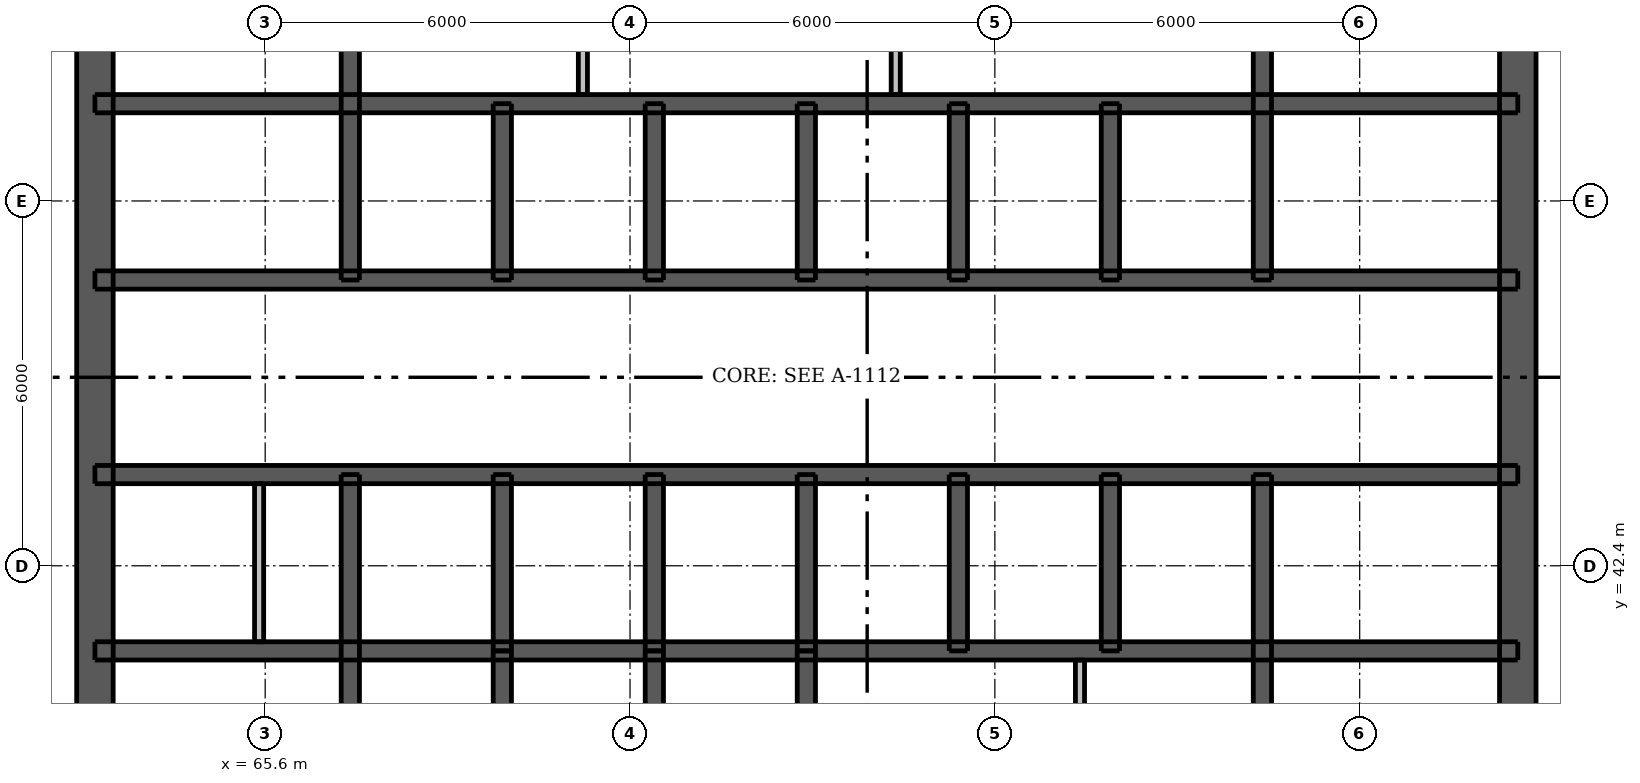
"""IFC4 building model, lengths in metres.
Left out: names, types, materials, properties, quantities, classifications, styles, units other than length and angle.
Written with IfcOpenShell. Run it as: python <this file> out.ifc"""

import sys

from ifc_helpers import new_model, si_unit, direction, frame, frame_2d, origin, place, context, subcontext, project, spatial, rectangle, extrude, element, fill, save


model = new_model("IFC4")
c1 = context("Model", 3, precision=1e-05, world=origin(), true_north=direction((0.0, 1.0)))
c2 = subcontext(c1, "Body", "Model", "MODEL_VIEW")
j1 = project(units=[si_unit("LENGTHUNIT", "METRE"), si_unit("PLANEANGLEUNIT", "RADIAN")], contexts=[c1])
p1 = place(None, origin())
s1 = spatial("IfcSite", under=j1, at=p1, CompositionType="ELEMENT")
p2 = place(p1, origin())
s2 = spatial("IfcBuilding", under=s1, at=p2, CompositionType="ELEMENT")
p3 = place(p2, frame((0.0, 0.0, 216.7)))
s3 = spatial("IfcBuildingStorey", under=s2, at=p3, CompositionType="ELEMENT", Elevation=216.7)
p4 = place(p3, frame((62.8, 33.5, 0.0), z_axis=(0.0, 0.0, 1.0), x_axis=(0.0, 1.0, 0.0)))
e1 = element("IfcWall", 1, at=p4, inside=s3, PredefinedType="SHEAR", context=c2, shape_type="SweptSolid", body=[
    extrude(rectangle(XDim=24.0, YDim=0.6, at=frame_2d((12.0, 0.0))), origin(), (0.0, 0.0, 1.0), 3.05),
])
p5 = place(p4, frame((11.2, 0.0, 0.0)))
e2 = element("IfcOpeningElement", 2, at=p5, cuts=e1, PredefinedType="OPENING", context=c2, shape_type="SweptSolid", body=[
    extrude(rectangle(XDim=1.6, YDim=2.1, at=frame_2d((0.8, 1.05))), frame((0.0, 0.31, 0.0), z_axis=(0.0, -1.0, 0.0), x_axis=(1.0, 0.0, 0.0)), (0.0, 0.0, 1.0), 0.62),
])
p6 = place(p3, frame((86.2, 33.5, 0.0), z_axis=(0.0, 0.0, 1.0), x_axis=(0.0, 1.0, 0.0)))
e3 = element("IfcWall", 3, at=p6, inside=s3, PredefinedType="SHEAR", context=c2, shape_type="SweptSolid", body=[
    extrude(rectangle(XDim=24.0, YDim=0.6, at=frame_2d((12.0, 0.0))), origin(), (0.0, 0.0, 1.0), 3.05),
])
p7 = place(p6, frame((11.2, 0.0, 0.0)))
e4 = element("IfcOpeningElement", 4, at=p7, cuts=e3, PredefinedType="OPENING", context=c2, shape_type="SweptSolid", body=[
    extrude(rectangle(XDim=1.6, YDim=2.1, at=frame_2d((0.8, 1.05))), frame((0.0, 0.31, 0.0), z_axis=(0.0, -1.0, 0.0), x_axis=(1.0, 0.0, 0.0)), (0.0, 0.0, 1.0), 0.62),
])
p8 = place(p3, frame((62.8, 41.0, 0.0), z_axis=(0.0, 0.0, 1.0), x_axis=(1.0, 0.0, 0.0)))
e5 = element("IfcWall", 5, at=p8, inside=s3, PredefinedType="SHEAR", context=c2, shape_type="SweptSolid", body=[
    extrude(rectangle(XDim=23.4, YDim=0.3, at=frame_2d((11.7, 0.0))), origin(), (0.0, 0.0, 1.0), 3.05),
])
p9 = place(p3, frame((62.8, 43.9, 0.0), z_axis=(0.0, 0.0, 1.0), x_axis=(1.0, 0.0, 0.0)))
e6 = element("IfcWall", 6, at=p9, inside=s3, PredefinedType="SHEAR", context=c2, shape_type="SweptSolid", body=[
    extrude(rectangle(XDim=23.4, YDim=0.3, at=frame_2d((11.7, 0.0))), origin(), (0.0, 0.0, 1.0), 3.05),
])
p10 = place(p9, frame((1.05, 0.0, 0.0)))
e7 = element("IfcOpeningElement", 7, at=p10, cuts=e6, PredefinedType="OPENING", context=c2, shape_type="SweptSolid", body=[
    extrude(rectangle(XDim=0.9, YDim=2.1, at=frame_2d((0.45, 1.05))), frame((0.0, 0.16, 0.0), z_axis=(0.0, -1.0, 0.0), x_axis=(1.0, 0.0, 0.0)), (0.0, 0.0, 1.0), 0.32),
])
p11 = place(p9, frame((2.975, 0.0, 0.0)))
e8 = element("IfcOpeningElement", 8, at=p11, cuts=e6, PredefinedType="OPENING", context=c2, shape_type="SweptSolid", body=[
    extrude(rectangle(XDim=0.8, YDim=2.1, at=frame_2d((0.4, 1.05))), frame((0.0, 0.16, 0.0), z_axis=(0.0, -1.0, 0.0), x_axis=(1.0, 0.0, 0.0)), (0.0, 0.0, 1.0), 0.32),
])
p12 = place(p9, frame((20.775, 0.0, 0.0)))
e9 = element("IfcOpeningElement", 9, at=p12, cuts=e6, PredefinedType="OPENING", context=c2, shape_type="SweptSolid", body=[
    extrude(rectangle(XDim=0.9, YDim=2.1, at=frame_2d((0.45, 1.05))), frame((0.0, 0.16, 0.0), z_axis=(0.0, -1.0, 0.0), x_axis=(1.0, 0.0, 0.0)), (0.0, 0.0, 1.0), 0.32),
])
p13 = place(p9, frame((7.5, 0.0, 0.0)))
e10 = element("IfcOpeningElement", 10, at=p13, cuts=e6, PredefinedType="OPENING", context=c2, shape_type="SweptSolid", body=[
    extrude(rectangle(XDim=0.9, YDim=2.1, at=frame_2d((0.45, 1.05))), frame((0.0, 0.16, 0.0), z_axis=(0.0, -1.0, 0.0), x_axis=(1.0, 0.0, 0.0)), (0.0, 0.0, 1.0), 0.32),
])
p14 = place(p9, frame((10.0, 0.0, 0.0)))
e11 = element("IfcOpeningElement", 11, at=p14, cuts=e6, PredefinedType="OPENING", context=c2, shape_type="SweptSolid", body=[
    extrude(rectangle(XDim=0.9, YDim=2.1, at=frame_2d((0.45, 1.05))), frame((0.0, 0.16, 0.0), z_axis=(0.0, -1.0, 0.0), x_axis=(1.0, 0.0, 0.0)), (0.0, 0.0, 1.0), 0.32),
])
p15 = place(p9, frame((15.0, 0.0, 0.0)))
e12 = element("IfcOpeningElement", 12, at=p15, cuts=e6, PredefinedType="OPENING", context=c2, shape_type="SweptSolid", body=[
    extrude(rectangle(XDim=0.9, YDim=2.1, at=frame_2d((0.45, 1.05))), frame((0.0, 0.16, 0.0), z_axis=(0.0, -1.0, 0.0), x_axis=(1.0, 0.0, 0.0)), (0.0, 0.0, 1.0), 0.32),
])
p16 = place(p9, frame((17.5, 0.0, 0.0)))
e13 = element("IfcOpeningElement", 13, at=p16, cuts=e6, PredefinedType="OPENING", context=c2, shape_type="SweptSolid", body=[
    extrude(rectangle(XDim=0.9, YDim=2.1, at=frame_2d((0.45, 1.05))), frame((0.0, 0.16, 0.0), z_axis=(0.0, -1.0, 0.0), x_axis=(1.0, 0.0, 0.0)), (0.0, 0.0, 1.0), 0.32),
])
p17 = place(p3, frame((62.8, 47.1, 0.0), z_axis=(0.0, 0.0, 1.0), x_axis=(1.0, 0.0, 0.0)))
e14 = element("IfcWall", 14, at=p17, inside=s3, PredefinedType="SHEAR", context=c2, shape_type="SweptSolid", body=[
    extrude(rectangle(XDim=23.4, YDim=0.3, at=frame_2d((11.7, 0.0))), origin(), (0.0, 0.0, 1.0), 3.05),
])
p18 = place(p17, frame((1.725, 0.0, 0.0)))
e15 = element("IfcOpeningElement", 15, at=p18, cuts=e14, PredefinedType="OPENING", context=c2, shape_type="SweptSolid", body=[
    extrude(rectangle(XDim=0.9, YDim=2.1, at=frame_2d((0.45, 1.05))), frame((0.0, 0.16, 0.0), z_axis=(0.0, -1.0, 0.0), x_axis=(1.0, 0.0, 0.0)), (0.0, 0.0, 1.0), 0.32),
])
p19 = place(p17, frame((20.775, 0.0, 0.0)))
e16 = element("IfcOpeningElement", 16, at=p19, cuts=e14, PredefinedType="OPENING", context=c2, shape_type="SweptSolid", body=[
    extrude(rectangle(XDim=0.9, YDim=2.1, at=frame_2d((0.45, 1.05))), frame((0.0, 0.16, 0.0), z_axis=(0.0, -1.0, 0.0), x_axis=(1.0, 0.0, 0.0)), (0.0, 0.0, 1.0), 0.32),
])
p20 = place(p17, frame((4.9, 0.0, 0.0)))
e17 = element("IfcOpeningElement", 17, at=p20, cuts=e14, PredefinedType="OPENING", context=c2, shape_type="SweptSolid", body=[
    extrude(rectangle(XDim=1.1, YDim=2.1, at=frame_2d((0.55, 1.05))), frame((0.0, 0.16, 0.0), z_axis=(0.0, -1.0, 0.0), x_axis=(1.0, 0.0, 0.0)), (0.0, 0.0, 1.0), 0.32),
])
p21 = place(p17, frame((7.4, 0.0, 0.0)))
e18 = element("IfcOpeningElement", 18, at=p21, cuts=e14, PredefinedType="OPENING", context=c2, shape_type="SweptSolid", body=[
    extrude(rectangle(XDim=1.1, YDim=2.1, at=frame_2d((0.55, 1.05))), frame((0.0, 0.16, 0.0), z_axis=(0.0, -1.0, 0.0), x_axis=(1.0, 0.0, 0.0)), (0.0, 0.0, 1.0), 0.32),
])
p22 = place(p17, frame((9.9, 0.0, 0.0)))
e19 = element("IfcOpeningElement", 19, at=p22, cuts=e14, PredefinedType="OPENING", context=c2, shape_type="SweptSolid", body=[
    extrude(rectangle(XDim=1.1, YDim=2.1, at=frame_2d((0.55, 1.05))), frame((0.0, 0.16, 0.0), z_axis=(0.0, -1.0, 0.0), x_axis=(1.0, 0.0, 0.0)), (0.0, 0.0, 1.0), 0.32),
])
p23 = place(p17, frame((12.4, 0.0, 0.0)))
e20 = element("IfcOpeningElement", 20, at=p23, cuts=e14, PredefinedType="OPENING", context=c2, shape_type="SweptSolid", body=[
    extrude(rectangle(XDim=1.1, YDim=2.1, at=frame_2d((0.55, 1.05))), frame((0.0, 0.16, 0.0), z_axis=(0.0, -1.0, 0.0), x_axis=(1.0, 0.0, 0.0)), (0.0, 0.0, 1.0), 0.32),
])
p24 = place(p17, frame((14.9, 0.0, 0.0)))
e21 = element("IfcOpeningElement", 21, at=p24, cuts=e14, PredefinedType="OPENING", context=c2, shape_type="SweptSolid", body=[
    extrude(rectangle(XDim=1.1, YDim=2.1, at=frame_2d((0.55, 1.05))), frame((0.0, 0.16, 0.0), z_axis=(0.0, -1.0, 0.0), x_axis=(1.0, 0.0, 0.0)), (0.0, 0.0, 1.0), 0.32),
])
p25 = place(p17, frame((17.4, 0.0, 0.0)))
e22 = element("IfcOpeningElement", 22, at=p25, cuts=e14, PredefinedType="OPENING", context=c2, shape_type="SweptSolid", body=[
    extrude(rectangle(XDim=1.1, YDim=2.1, at=frame_2d((0.55, 1.05))), frame((0.0, 0.16, 0.0), z_axis=(0.0, -1.0, 0.0), x_axis=(1.0, 0.0, 0.0)), (0.0, 0.0, 1.0), 0.32),
])
p26 = place(p3, frame((62.8, 50.0, 0.0), z_axis=(0.0, 0.0, 1.0), x_axis=(1.0, 0.0, 0.0)))
e23 = element("IfcWall", 23, at=p26, inside=s3, PredefinedType="SHEAR", context=c2, shape_type="SweptSolid", body=[
    extrude(rectangle(XDim=23.4, YDim=0.3, at=frame_2d((11.7, 0.0))), origin(), (0.0, 0.0, 1.0), 3.05),
])
p27 = place(p3, frame((67.0, 33.8, 0.0), z_axis=(0.0, 0.0, 1.0), x_axis=(0.0, 1.0, 0.0)))
e24 = element("IfcWall", 24, at=p27, inside=s3, PredefinedType="SHEAR", context=c2, shape_type="SweptSolid", body=[
    extrude(rectangle(XDim=10.1, YDim=0.3, at=frame_2d((5.05, 0.0))), origin(), (0.0, 0.0, 1.0), 3.05),
])
p28 = place(p27, frame((0.5, 0.0, 0.0)))
e25 = element("IfcOpeningElement", 25, at=p28, cuts=e24, PredefinedType="OPENING", context=c2, shape_type="SweptSolid", body=[
    extrude(rectangle(XDim=1.1, YDim=2.1, at=frame_2d((0.55, 1.05))), frame((0.0, 0.16, 0.0), z_axis=(0.0, -1.0, 0.0), x_axis=(1.0, 0.0, 0.0)), (0.0, 0.0, 1.0), 0.32),
])
for number, where, z_axis, x_axis in (
    (26, (67.0, 47.1, 0.0), (0.0, 0.0, 1.0), (0.0, 1.0, 0.0)),
    (27, (82.0, 33.8, 0.0), (0.0, 0.0, 1.0), (0.0, 1.0, 0.0)),
    (28, (82.0, 47.1, 0.0), (0.0, 0.0, 1.0), (0.0, 1.0, 0.0)),
):
    element("IfcWall", number, at=place(p3, frame(where, z_axis=z_axis, x_axis=x_axis)), inside=s3, PredefinedType="SHEAR", context=c2, shape_type="SweptSolid", body=[
        extrude(rectangle(XDim=10.1, YDim=0.3, at=frame_2d((5.05, 0.0))), origin(), (0.0, 0.0, 1.0), 3.05),
    ])
for number, where, z_axis, x_axis in (
    (29, (69.5, 41.0, 0.0), (0.0, 0.0, 1.0), (0.0, 1.0, 0.0)),
    (30, (69.5, 47.1, 0.0), (0.0, 0.0, 1.0), (0.0, 1.0, 0.0)),
    (31, (72.0, 41.0, 0.0), (0.0, 0.0, 1.0), (0.0, 1.0, 0.0)),
    (32, (72.0, 47.1, 0.0), (0.0, 0.0, 1.0), (0.0, 1.0, 0.0)),
    (33, (74.5, 41.0, 0.0), (0.0, 0.0, 1.0), (0.0, 1.0, 0.0)),
    (34, (74.5, 47.1, 0.0), (0.0, 0.0, 1.0), (0.0, 1.0, 0.0)),
    (35, (77.0, 41.0, 0.0), (0.0, 0.0, 1.0), (0.0, 1.0, 0.0)),
    (36, (77.0, 47.1, 0.0), (0.0, 0.0, 1.0), (0.0, 1.0, 0.0)),
    (37, (79.5, 41.0, 0.0), (0.0, 0.0, 1.0), (0.0, 1.0, 0.0)),
    (38, (79.5, 47.1, 0.0), (0.0, 0.0, 1.0), (0.0, 1.0, 0.0)),
    (39, (69.5, 38.1, 0.0), (0.0, 0.0, 1.0), (0.0, 1.0, 0.0)),
    (40, (72.0, 38.1, 0.0), (0.0, 0.0, 1.0), (0.0, 1.0, 0.0)),
    (41, (74.5, 38.1, 0.0), (0.0, 0.0, 1.0), (0.0, 1.0, 0.0)),
):
    element("IfcWall", number, at=place(p3, frame(where, z_axis=z_axis, x_axis=x_axis)), inside=s3, PredefinedType="SHEAR", context=c2, shape_type="SweptSolid", body=[
        extrude(rectangle(XDim=2.9, YDim=0.3, at=frame_2d((1.45, 0.0))), origin(), (0.0, 0.0, 1.0), 3.05),
    ])
p29 = place(p3, frame((79.0, 34.1, 0.0), z_axis=(0.0, 0.0, 1.0), x_axis=(0.0, 1.0, 0.0)))
e42 = element("IfcWall", 42, at=p29, inside=s3, PredefinedType="PLUMBINGWALL", context=c2, shape_type="SweptSolid", body=[
    extrude(rectangle(XDim=6.75, YDim=0.15, at=frame_2d((3.375, 0.0))), origin(), (0.0, 0.0, 1.0), 3.05),
])
p30 = place(p3, frame((65.5, 41.15, 0.0), z_axis=(0.0, 0.0, 1.0), x_axis=(0.0, 1.0, 0.0)))
e43 = element("IfcWall", 43, at=p30, inside=s3, PredefinedType="PLUMBINGWALL", context=c2, shape_type="SweptSolid", body=[
    extrude(rectangle(XDim=2.6, YDim=0.15, at=frame_2d((1.3, 0.0))), origin(), (0.0, 0.0, 1.0), 3.05),
])
for number, where, z_axis, x_axis in (
    (44, (70.825, 50.15, 0.0), (0.0, 0.0, 1.0), (0.0, 1.0, 0.0)),
    (45, (75.97, 50.15, 0.0), (0.0, 0.0, 1.0), (0.0, 1.0, 0.0)),
):
    element("IfcWall", number, at=place(p3, frame(where, z_axis=z_axis, x_axis=x_axis)), inside=s3, PredefinedType="PLUMBINGWALL", context=c2, shape_type="SweptSolid", body=[
        extrude(rectangle(XDim=6.75, YDim=0.15, at=frame_2d((3.375, 0.0))), origin(), (0.0, 0.0, 1.0), 3.05),
    ])
p31 = place(p5, origin())
e46 = element("IfcDoor", 46, at=p31, inside=s3, OperationType="DOUBLE_DOOR_SINGLE_SWING", PredefinedType="DOOR", context=c2, shape_type="SweptSolid", body=[
    extrude(rectangle(XDim=1.6, YDim=2.1, at=frame_2d((0.8, 1.05))), frame((0.0, -0.237, 0.0), z_axis=(0.0, -1.0, 0.0), x_axis=(1.0, 0.0, 0.0)), (0.0, 0.0, 1.0), 0.05),
])
fill(e2, e46)
p32 = place(p7, origin())
e47 = element("IfcDoor", 47, at=p32, inside=s3, OperationType="DOUBLE_DOOR_SINGLE_SWING", PredefinedType="DOOR", context=c2, shape_type="SweptSolid", body=[
    extrude(rectangle(XDim=1.6, YDim=2.1, at=frame_2d((0.8, 1.05))), frame((0.0, 0.288, 0.0), z_axis=(0.0, -1.0, 0.0), x_axis=(1.0, 0.0, 0.0)), (0.0, 0.0, 1.0), 0.05),
])
fill(e4, e47)
p33 = place(p10, origin())
e48 = element("IfcDoor", 48, at=p33, inside=s3, OperationType="SINGLE_SWING_LEFT", PredefinedType="DOOR", context=c2, shape_type="SweptSolid", body=[
    extrude(rectangle(XDim=0.9, YDim=2.1, at=frame_2d((0.45, 1.05))), frame((0.0, -0.087, 0.0), z_axis=(0.0, -1.0, 0.0), x_axis=(1.0, 0.0, 0.0)), (0.0, 0.0, 1.0), 0.05),
])
fill(e7, e48)
p34 = place(p11, origin())
e49 = element("IfcDoor", 49, at=p34, inside=s3, OperationType="SINGLE_SWING_RIGHT", PredefinedType="DOOR", context=c2, shape_type="SweptSolid", body=[
    extrude(rectangle(XDim=0.8, YDim=2.1, at=frame_2d((0.4, 1.05))), frame((0.0, -0.087, 0.0), z_axis=(0.0, -1.0, 0.0), x_axis=(1.0, 0.0, 0.0)), (0.0, 0.0, 1.0), 0.05),
])
fill(e8, e49)
p35 = place(p12, origin())
e50 = element("IfcDoor", 50, at=p35, inside=s3, OperationType="SINGLE_SWING_LEFT", PredefinedType="DOOR", context=c2, shape_type="SweptSolid", body=[
    extrude(rectangle(XDim=0.9, YDim=2.1, at=frame_2d((0.45, 1.05))), frame((0.0, -0.087, 0.0), z_axis=(0.0, -1.0, 0.0), x_axis=(1.0, 0.0, 0.0)), (0.0, 0.0, 1.0), 0.05),
])
fill(e9, e50)
p36 = place(p18, origin())
e51 = element("IfcDoor", 51, at=p36, inside=s3, OperationType="SINGLE_SWING_LEFT", PredefinedType="DOOR", context=c2, shape_type="SweptSolid", body=[
    extrude(rectangle(XDim=0.9, YDim=2.1, at=frame_2d((0.45, 1.05))), frame((0.0, 0.138, 0.0), z_axis=(0.0, -1.0, 0.0), x_axis=(1.0, 0.0, 0.0)), (0.0, 0.0, 1.0), 0.05),
])
fill(e15, e51)
p37 = place(p19, origin())
e52 = element("IfcDoor", 52, at=p37, inside=s3, OperationType="SINGLE_SWING_LEFT", PredefinedType="DOOR", context=c2, shape_type="SweptSolid", body=[
    extrude(rectangle(XDim=0.9, YDim=2.1, at=frame_2d((0.45, 1.05))), frame((0.0, 0.138, 0.0), z_axis=(0.0, -1.0, 0.0), x_axis=(1.0, 0.0, 0.0)), (0.0, 0.0, 1.0), 0.05),
])
fill(e16, e52)
p38 = place(p13, origin())
e53 = element("IfcDoor", 53, at=p38, inside=s3, OperationType="SINGLE_SWING_LEFT", PredefinedType="DOOR", context=c2, shape_type="SweptSolid", body=[
    extrude(rectangle(XDim=0.9, YDim=2.1, at=frame_2d((0.45, 1.05))), frame((0.0, -0.087, 0.0), z_axis=(0.0, -1.0, 0.0), x_axis=(1.0, 0.0, 0.0)), (0.0, 0.0, 1.0), 0.05),
])
fill(e10, e53)
p39 = place(p14, origin())
e54 = element("IfcDoor", 54, at=p39, inside=s3, OperationType="SINGLE_SWING_RIGHT", PredefinedType="DOOR", context=c2, shape_type="SweptSolid", body=[
    extrude(rectangle(XDim=0.9, YDim=2.1, at=frame_2d((0.45, 1.05))), frame((0.0, -0.087, 0.0), z_axis=(0.0, -1.0, 0.0), x_axis=(1.0, 0.0, 0.0)), (0.0, 0.0, 1.0), 0.05),
])
fill(e11, e54)
p40 = place(p15, origin())
e55 = element("IfcDoor", 55, at=p40, inside=s3, OperationType="SINGLE_SWING_RIGHT", PredefinedType="DOOR", context=c2, shape_type="SweptSolid", body=[
    extrude(rectangle(XDim=0.9, YDim=2.1, at=frame_2d((0.45, 1.05))), frame((0.0, -0.087, 0.0), z_axis=(0.0, -1.0, 0.0), x_axis=(1.0, 0.0, 0.0)), (0.0, 0.0, 1.0), 0.05),
])
fill(e12, e55)
p41 = place(p16, origin())
e56 = element("IfcDoor", 56, at=p41, inside=s3, OperationType="SINGLE_SWING_LEFT", PredefinedType="DOOR", context=c2, shape_type="SweptSolid", body=[
    extrude(rectangle(XDim=0.9, YDim=2.1, at=frame_2d((0.45, 1.05))), frame((0.0, -0.087, 0.0), z_axis=(0.0, -1.0, 0.0), x_axis=(1.0, 0.0, 0.0)), (0.0, 0.0, 1.0), 0.05),
])
fill(e13, e56)
p42 = place(p20, origin())
e57 = element("IfcDoor", 57, at=p42, inside=s3, OperationType="DOUBLE_DOOR_SLIDING", PredefinedType="DOOR", context=c2, shape_type="SweptSolid", body=[
    extrude(rectangle(XDim=1.1, YDim=2.1, at=frame_2d((0.55, 1.05))), frame((0.0, 0.025, 0.0), z_axis=(0.0, -1.0, 0.0), x_axis=(1.0, 0.0, 0.0)), (0.0, 0.0, 1.0), 0.05),
])
fill(e17, e57)
p43 = place(p21, origin())
e58 = element("IfcDoor", 58, at=p43, inside=s3, OperationType="DOUBLE_DOOR_SLIDING", PredefinedType="DOOR", context=c2, shape_type="SweptSolid", body=[
    extrude(rectangle(XDim=1.1, YDim=2.1, at=frame_2d((0.55, 1.05))), frame((0.0, 0.025, 0.0), z_axis=(0.0, -1.0, 0.0), x_axis=(1.0, 0.0, 0.0)), (0.0, 0.0, 1.0), 0.05),
])
fill(e18, e58)
p44 = place(p22, origin())
e59 = element("IfcDoor", 59, at=p44, inside=s3, OperationType="DOUBLE_DOOR_SLIDING", PredefinedType="DOOR", context=c2, shape_type="SweptSolid", body=[
    extrude(rectangle(XDim=1.1, YDim=2.1, at=frame_2d((0.55, 1.05))), frame((0.0, 0.025, 0.0), z_axis=(0.0, -1.0, 0.0), x_axis=(1.0, 0.0, 0.0)), (0.0, 0.0, 1.0), 0.05),
])
fill(e19, e59)
p45 = place(p23, origin())
e60 = element("IfcDoor", 60, at=p45, inside=s3, OperationType="DOUBLE_DOOR_SLIDING", PredefinedType="DOOR", context=c2, shape_type="SweptSolid", body=[
    extrude(rectangle(XDim=1.1, YDim=2.1, at=frame_2d((0.55, 1.05))), frame((0.0, 0.025, 0.0), z_axis=(0.0, -1.0, 0.0), x_axis=(1.0, 0.0, 0.0)), (0.0, 0.0, 1.0), 0.05),
])
fill(e20, e60)
p46 = place(p24, origin())
e61 = element("IfcDoor", 61, at=p46, inside=s3, OperationType="DOUBLE_DOOR_SLIDING", PredefinedType="DOOR", context=c2, shape_type="SweptSolid", body=[
    extrude(rectangle(XDim=1.1, YDim=2.1, at=frame_2d((0.55, 1.05))), frame((0.0, 0.025, 0.0), z_axis=(0.0, -1.0, 0.0), x_axis=(1.0, 0.0, 0.0)), (0.0, 0.0, 1.0), 0.05),
])
fill(e21, e61)
p47 = place(p25, origin())
e62 = element("IfcDoor", 62, at=p47, inside=s3, OperationType="DOUBLE_DOOR_SLIDING", PredefinedType="DOOR", context=c2, shape_type="SweptSolid", body=[
    extrude(rectangle(XDim=1.1, YDim=2.1, at=frame_2d((0.55, 1.05))), frame((0.0, 0.025, 0.0), z_axis=(0.0, -1.0, 0.0), x_axis=(1.0, 0.0, 0.0)), (0.0, 0.0, 1.0), 0.05),
])
fill(e22, e62)
save(model, sys.argv[1])
